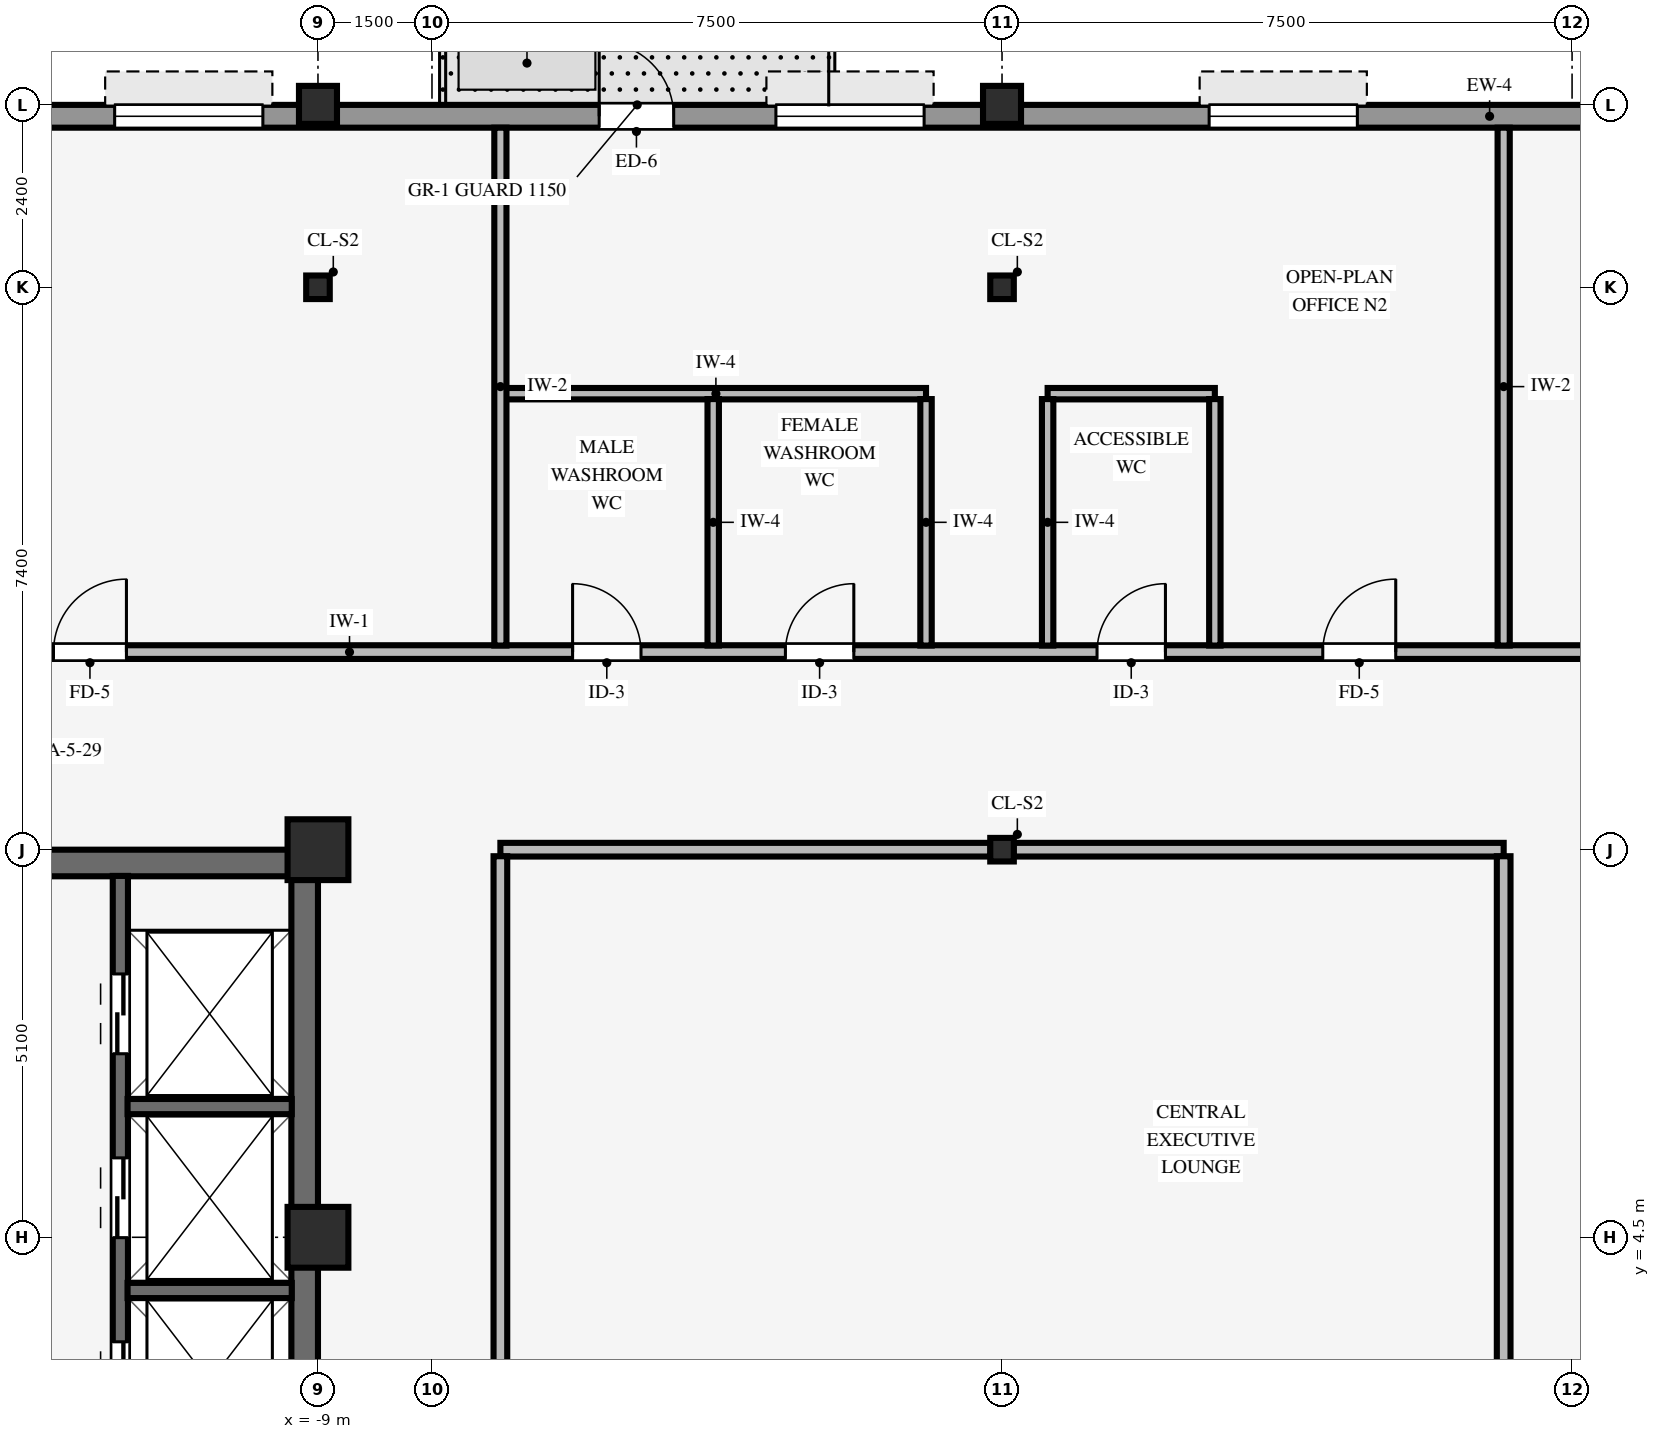
"""IFC4 building model, lengths in metres.
Left out: names, types, materials, properties, quantities, classifications, styles, units other than length and angle.
Written with IfcOpenShell. Run it as: python <this file> out.ifc"""

import sys

from ifc_helpers import new_model, si_unit, direction, frame, frame_2d, origin, origin_2d, place, context, subcontext, project, spatial, rectangle, hollow_rectangle, i_section, extrude, source, transform, mapped, element, fill, save


model = new_model("IFC4")
c1 = context("Model", 3, precision=1e-05, world=origin(), true_north=direction((0.0, 1.0)))
c2 = subcontext(c1, "Body", "Model", "MODEL_VIEW")
j1 = project(units=[si_unit("LENGTHUNIT", "METRE"), si_unit("PLANEANGLEUNIT", "RADIAN")], contexts=[c1])
p1 = place(None, origin())
s1 = spatial("IfcSite", under=j1, at=p1, CompositionType="ELEMENT")
p2 = place(p1, origin())
s2 = spatial("IfcBuilding", under=s1, at=p2, CompositionType="ELEMENT")
p3 = place(p2, frame((0.0, 0.0, 245.65)))
s3 = spatial("IfcBuildingStorey", under=s2, at=p3, CompositionType="ELEMENT", Elevation=245.65)
p4 = place(p3, frame((-17.5, 9.425, 0.0), z_axis=(0.0, 0.0, 1.0), x_axis=(1.0, 0.0, 0.0)))
e1 = element("IfcWall", 1, at=p4, inside=s3, PredefinedType="SHEAR", context=c2, shape_type="SweptSolid", body=[
    extrude(rectangle(XDim=8.5, YDim=0.35, at=frame_2d((4.25, 0.0))), origin(), (0.0, 0.0, 1.0), 3.37),
])
p5 = place(p3, frame((-9.175, -9.255, 0.0), z_axis=(0.0, 0.0, 1.0), x_axis=(0.0, 1.0, 0.0)))
e2 = element("IfcWall", 2, at=p5, inside=s3, PredefinedType="SHEAR", context=c2, shape_type="SweptSolid", body=[
    extrude(rectangle(XDim=18.51, YDim=0.35, at=frame_2d((9.255, 0.0))), origin(), (0.0, 0.0, 1.0), 3.37),
])
p6 = place(p5, frame((8.655, 0.0, 0.0)))
e3 = element("IfcOpeningElement", 3, at=p6, cuts=e2, PredefinedType="OPENING", context=c2, shape_type="SweptSolid", body=[
    extrude(rectangle(XDim=1.2, YDim=2.15, at=frame_2d((0.6, 1.075))), frame((0.0, 0.185, 0.0), z_axis=(0.0, -1.0, 0.0), x_axis=(1.0, 0.0, 0.0)), (0.0, 0.0, 1.0), 0.37),
])
for number, where, z_axis, x_axis in (
    (4, (-9.0, 4.5, 0.0), (0.0, 0.0, 1.0), (1.0, 0.0, 0.0)),
    (5, (-9.0, 9.6, 0.0), (0.0, 0.0, 1.0), (1.0, 0.0, 0.0)),
):
    element("IfcColumn", number, at=place(p3, frame(where, z_axis=z_axis, x_axis=x_axis)), inside=s3, PredefinedType="COLUMN", context=c2, shape_type="SweptSolid", body=[
        extrude(rectangle(XDim=0.8, YDim=0.8, at=origin_2d()), origin(), (0.0, 0.0, 1.0), 3.37),
    ])
for number, where, z_axis, x_axis in (
    (6, (-9.0, 19.4, 0.0), (0.0, 0.0, 1.0), (1.0, 0.0, 0.0)),
    (7, (0.0, 19.4, 0.0), (0.0, 0.0, 1.0), (1.0, 0.0, 0.0)),
):
    element("IfcColumn", number, at=place(p3, frame(where, z_axis=z_axis, x_axis=x_axis)), inside=s3, PredefinedType="COLUMN", context=c2, shape_type="SweptSolid", body=[
        extrude(hollow_rectangle(XDim=0.5, YDim=0.5, WallThickness=0.032, InnerFilletRadius=0.032, OuterFilletRadius=0.064, at=origin_2d()), origin(), (0.0, 0.0, 1.0), 3.37),
    ])
for number, where, z_axis, x_axis in (
    (8, (0.0, 9.6, 0.0), (0.0, 0.0, 1.0), (1.0, 0.0, 0.0)),
    (9, (0.0, 17.0, 0.0), (0.0, 0.0, 1.0), (1.0, 0.0, 0.0)),
    (10, (-9.0, 17.0, 0.0), (0.0, 0.0, 1.0), (1.0, 0.0, 0.0)),
):
    element("IfcColumn", number, at=place(p3, frame(where, z_axis=z_axis, x_axis=x_axis)), inside=s3, PredefinedType="COLUMN", context=c2, shape_type="SweptSolid", body=[
        extrude(i_section(OverallWidth=0.31, OverallDepth=0.31, WebThickness=0.015, FlangeThickness=0.015, FilletRadius=0.015, at=origin_2d()), origin(), (0.0, 0.0, 1.0), 3.37),
    ])
p7 = place(p3, frame((-18.9, 19.25, 0.0), z_axis=(0.0, 0.0, 1.0), x_axis=(1.0, 0.0, 0.0)))
e11 = element("IfcWall", 11, at=p7, inside=s3, PredefinedType="STANDARD", context=c2, shape_type="SweptSolid", body=[
    extrude(rectangle(XDim=35.6, YDim=0.3, at=frame_2d((17.8, 0.0))), origin(), (0.0, 0.0, 1.0), 2.705),
])
p8 = place(p7, frame((13.6, 0.0, 0.0)))
e12 = element("IfcOpeningElement", 12, at=p8, cuts=e11, PredefinedType="OPENING", context=c2, shape_type="SweptSolid", body=[
    extrude(rectangle(XDim=0.98, YDim=2.15, at=frame_2d((0.49, 1.075))), frame((0.0, 0.16, 0.0), z_axis=(0.0, -1.0, 0.0), x_axis=(1.0, 0.0, 0.0)), (0.0, 0.0, 1.0), 0.32),
])
p9 = place(p7, frame((2.425, 0.0, 0.8)))
e13 = element("IfcOpeningElement", 13, at=p9, cuts=e11, PredefinedType="OPENING", context=c2, shape_type="SweptSolid", body=[
    extrude(rectangle(XDim=1.95, YDim=1.48, at=frame_2d((0.975, 0.74))), frame((0.0, 0.16, 0.0), z_axis=(0.0, -1.0, 0.0), x_axis=(1.0, 0.0, 0.0)), (0.0, 0.0, 1.0), 0.32),
])
p10 = place(p7, frame((7.225, 0.0, 0.8)))
e14 = element("IfcOpeningElement", 14, at=p10, cuts=e11, PredefinedType="OPENING", context=c2, shape_type="SweptSolid", body=[
    extrude(rectangle(XDim=1.95, YDim=1.48, at=frame_2d((0.975, 0.74))), frame((0.0, 0.16, 0.0), z_axis=(0.0, -1.0, 0.0), x_axis=(1.0, 0.0, 0.0)), (0.0, 0.0, 1.0), 0.32),
])
p11 = place(p7, frame((15.925, 0.0, 0.8)))
e15 = element("IfcOpeningElement", 15, at=p11, cuts=e11, PredefinedType="OPENING", context=c2, shape_type="SweptSolid", body=[
    extrude(rectangle(XDim=1.95, YDim=1.48, at=frame_2d((0.975, 0.74))), frame((0.0, 0.16, 0.0), z_axis=(0.0, -1.0, 0.0), x_axis=(1.0, 0.0, 0.0)), (0.0, 0.0, 1.0), 0.32),
])
p12 = place(p7, frame((21.625, 0.0, 0.8)))
e16 = element("IfcOpeningElement", 16, at=p12, cuts=e11, PredefinedType="OPENING", context=c2, shape_type="SweptSolid", body=[
    extrude(rectangle(XDim=1.95, YDim=1.48, at=frame_2d((0.975, 0.74))), frame((0.0, 0.16, 0.0), z_axis=(0.0, -1.0, 0.0), x_axis=(1.0, 0.0, 0.0)), (0.0, 0.0, 1.0), 0.32),
])
p13 = place(p7, frame((32.125, 0.0, 0.8)))
e17 = element("IfcOpeningElement", 17, at=p13, cuts=e11, PredefinedType="OPENING", context=c2, shape_type="SweptSolid", body=[
    extrude(rectangle(XDim=1.95, YDim=1.48, at=frame_2d((0.975, 0.74))), frame((0.0, 0.16, 0.0), z_axis=(0.0, -1.0, 0.0), x_axis=(1.0, 0.0, 0.0)), (0.0, 0.0, 1.0), 0.32),
])
p14 = place(p3, frame((-11.6, 1.3, 0.0), z_axis=(0.0, 0.0, 1.0), x_axis=(0.0, 1.0, 0.0)))
e18 = element("IfcWall", 18, at=p14, inside=s3, PredefinedType="SHEAR", context=c2, shape_type="SweptSolid", body=[
    extrude(rectangle(XDim=7.955, YDim=0.2, at=frame_2d((3.978, 0.0))), origin(), (0.0, 0.0, 1.0), 3.37),
])
p15 = place(p14, frame((0.775, 0.0, 0.0)))
e19 = element("IfcOpeningElement", 19, at=p15, cuts=e18, PredefinedType="OPENING", context=c2, shape_type="SweptSolid", body=[
    extrude(rectangle(XDim=1.05, YDim=2.15, at=frame_2d((0.525, 1.075))), frame((0.0, 0.11, 0.0), z_axis=(0.0, -1.0, 0.0), x_axis=(1.0, 0.0, 0.0)), (0.0, 0.0, 1.0), 0.22),
])
p16 = place(p14, frame((3.195, 0.0, 0.0)))
e20 = element("IfcOpeningElement", 20, at=p16, cuts=e18, PredefinedType="OPENING", context=c2, shape_type="SweptSolid", body=[
    extrude(rectangle(XDim=1.05, YDim=2.15, at=frame_2d((0.525, 1.075))), frame((0.0, 0.11, 0.0), z_axis=(0.0, -1.0, 0.0), x_axis=(1.0, 0.0, 0.0)), (0.0, 0.0, 1.0), 0.22),
])
p17 = place(p14, frame((5.615, 0.0, 0.0)))
e21 = element("IfcOpeningElement", 21, at=p17, cuts=e18, PredefinedType="OPENING", context=c2, shape_type="SweptSolid", body=[
    extrude(rectangle(XDim=1.05, YDim=2.15, at=frame_2d((0.525, 1.075))), frame((0.0, 0.11, 0.0), z_axis=(0.0, -1.0, 0.0), x_axis=(1.0, 0.0, 0.0)), (0.0, 0.0, 1.0), 0.22),
])
for number, where, z_axis, x_axis in (
    (22, (-11.505, 3.8, 0.0), (0.0, 0.0, 1.0), (1.0, 0.0, 0.0)),
    (23, (-11.505, 6.22, 0.0), (0.0, 0.0, 1.0), (1.0, 0.0, 0.0)),
):
    element("IfcWall", number, at=place(p3, frame(where, z_axis=z_axis, x_axis=x_axis)), inside=s3, PredefinedType="SHEAR", context=c2, shape_type="SweptSolid", body=[
        extrude(rectangle(XDim=2.16, YDim=0.2, at=frame_2d((1.08, 0.0))), origin(), (0.0, 0.0, 1.0), 3.37),
    ])
for number, where, z_axis, x_axis in (
    (24, (-6.6, 9.6, 0.0), (0.0, 0.0, 1.0), (1.0, 0.0, 0.0)),
    (25, (0.151, 9.6, 0.0), (0.0, 0.0, 1.0), (1.0, 0.0, 0.0)),
):
    element("IfcWall", number, at=place(p3, frame(where, z_axis=z_axis, x_axis=x_axis)), inside=s3, PredefinedType="PARTITIONING", context=c2, shape_type="SweptSolid", body=[
        extrude(rectangle(XDim=6.449, YDim=0.18, at=frame_2d((3.225, 0.0))), origin(), (0.0, 0.0, 1.0), 2.405),
    ])
p18 = place(p3, frame((-15.0, 12.2, 0.0), z_axis=(0.0, 0.0, 1.0), x_axis=(1.0, 0.0, 0.0)))
e26 = element("IfcWall", 26, at=p18, inside=s3, PredefinedType="PARTITIONING", context=c2, shape_type="SweptSolid", body=[
    extrude(rectangle(XDim=30.8, YDim=0.18, at=frame_2d((15.4, 0.0))), origin(), (0.0, 0.0, 1.0), 3.36),
])
p19 = place(p18, frame((2.52, 0.0, 0.0)))
e27 = element("IfcOpeningElement", 27, at=p19, cuts=e26, PredefinedType="OPENING", context=c2, shape_type="SweptSolid", body=[
    extrude(rectangle(XDim=0.96, YDim=2.1, at=frame_2d((0.48, 1.05))), frame((0.0, 0.1, 0.0), z_axis=(0.0, -1.0, 0.0), x_axis=(1.0, 0.0, 0.0)), (0.0, 0.0, 1.0), 0.2),
])
p20 = place(p18, frame((19.22, 0.0, 0.0)))
e28 = element("IfcOpeningElement", 28, at=p20, cuts=e26, PredefinedType="OPENING", context=c2, shape_type="SweptSolid", body=[
    extrude(rectangle(XDim=0.96, YDim=2.1, at=frame_2d((0.48, 1.05))), frame((0.0, 0.1, 0.0), z_axis=(0.0, -1.0, 0.0), x_axis=(1.0, 0.0, 0.0)), (0.0, 0.0, 1.0), 0.2),
])
p21 = place(p18, frame((25.32, 0.0, 0.0)))
e29 = element("IfcOpeningElement", 29, at=p21, cuts=e26, PredefinedType="OPENING", context=c2, shape_type="SweptSolid", body=[
    extrude(rectangle(XDim=0.96, YDim=2.1, at=frame_2d((0.48, 1.05))), frame((0.0, 0.1, 0.0), z_axis=(0.0, -1.0, 0.0), x_axis=(1.0, 0.0, 0.0)), (0.0, 0.0, 1.0), 0.2),
])
p22 = place(p18, frame((28.72, 0.0, 0.0)))
e30 = element("IfcOpeningElement", 30, at=p22, cuts=e26, PredefinedType="OPENING", context=c2, shape_type="SweptSolid", body=[
    extrude(rectangle(XDim=0.96, YDim=2.1, at=frame_2d((0.48, 1.05))), frame((0.0, 0.1, 0.0), z_axis=(0.0, -1.0, 0.0), x_axis=(1.0, 0.0, 0.0)), (0.0, 0.0, 1.0), 0.2),
])
p23 = place(p18, frame((9.35, 0.0, 0.0)))
e31 = element("IfcOpeningElement", 31, at=p23, cuts=e26, PredefinedType="OPENING", context=c2, shape_type="SweptSolid", body=[
    extrude(rectangle(XDim=0.9, YDim=2.1, at=frame_2d((0.45, 1.05))), frame((0.0, 0.1, 0.0), z_axis=(0.0, -1.0, 0.0), x_axis=(1.0, 0.0, 0.0)), (0.0, 0.0, 1.0), 0.2),
])
p24 = place(p18, frame((12.15, 0.0, 0.0)))
e32 = element("IfcOpeningElement", 32, at=p24, cuts=e26, PredefinedType="OPENING", context=c2, shape_type="SweptSolid", body=[
    extrude(rectangle(XDim=0.9, YDim=2.1, at=frame_2d((0.45, 1.05))), frame((0.0, 0.1, 0.0), z_axis=(0.0, -1.0, 0.0), x_axis=(1.0, 0.0, 0.0)), (0.0, 0.0, 1.0), 0.2),
])
p25 = place(p18, frame((16.25, 0.0, 0.0)))
e33 = element("IfcOpeningElement", 33, at=p25, cuts=e26, PredefinedType="OPENING", context=c2, shape_type="SweptSolid", body=[
    extrude(rectangle(XDim=0.9, YDim=2.1, at=frame_2d((0.45, 1.05))), frame((0.0, 0.1, 0.0), z_axis=(0.0, -1.0, 0.0), x_axis=(1.0, 0.0, 0.0)), (0.0, 0.0, 1.0), 0.2),
])
p26 = place(p3, frame((-6.529, 15.6, 0.0), z_axis=(0.0, 0.0, 1.0), x_axis=(1.0, 0.0, 0.0)))
e34 = element("IfcWall", 34, at=p26, inside=s3, PredefinedType="PARTITIONING", context=c2, shape_type="SweptSolid", body=[
    extrude(rectangle(XDim=5.529, YDim=0.15, at=frame_2d((2.765, 0.0))), origin(), (0.0, 0.0, 1.0), 3.36),
])
p27 = place(p3, frame((0.6, 15.6, 0.0), z_axis=(0.0, 0.0, 1.0), x_axis=(1.0, 0.0, 0.0)))
e35 = element("IfcWall", 35, at=p27, inside=s3, PredefinedType="PARTITIONING", context=c2, shape_type="SweptSolid", body=[
    extrude(rectangle(XDim=2.2, YDim=0.15, at=frame_2d((1.1, 0.0))), origin(), (0.0, 0.0, 1.0), 3.36),
])
p28 = place(p3, frame((-6.6, 1.336, 0.0), z_axis=(0.0, 0.0, 1.0), x_axis=(0.0, 1.0, 0.0)))
e36 = element("IfcWall", 36, at=p28, inside=s3, PredefinedType="PARTITIONING", context=c2, shape_type="SweptSolid", body=[
    extrude(rectangle(XDim=8.178, YDim=0.18, at=frame_2d((4.089, 0.0))), origin(), (0.0, 0.0, 1.0), 3.36),
])
p29 = place(p3, frame((-6.6, 12.286, 0.0), z_axis=(0.0, 0.0, 1.0), x_axis=(0.0, 1.0, 0.0)))
e37 = element("IfcWall", 37, at=p29, inside=s3, PredefinedType="PARTITIONING", context=c2, shape_type="SweptSolid", body=[
    extrude(rectangle(XDim=6.814, YDim=0.16, at=frame_2d((3.407, 0.0))), origin(), (0.0, 0.0, 1.0), 3.36),
])
for number, where, z_axis, x_axis in (
    (38, (-3.8, 12.286, 0.0), (0.0, 0.0, 1.0), (0.0, 1.0, 0.0)),
    (39, (-1.0, 12.286, 0.0), (0.0, 0.0, 1.0), (0.0, 1.0, 0.0)),
    (40, (0.6, 12.286, 0.0), (0.0, 0.0, 1.0), (0.0, 1.0, 0.0)),
    (41, (2.8, 12.286, 0.0), (0.0, 0.0, 1.0), (0.0, 1.0, 0.0)),
):
    element("IfcWall", number, at=place(p3, frame(where, z_axis=z_axis, x_axis=x_axis)), inside=s3, PredefinedType="PARTITIONING", context=c2, shape_type="SweptSolid", body=[
        extrude(rectangle(XDim=3.243, YDim=0.15, at=frame_2d((1.622, 0.0))), origin(), (0.0, 0.0, 1.0), 3.36),
    ])
p30 = place(p3, frame((6.6, 1.336, 0.0), z_axis=(0.0, 0.0, 1.0), x_axis=(0.0, 1.0, 0.0)))
e42 = element("IfcWall", 42, at=p30, inside=s3, PredefinedType="PARTITIONING", context=c2, shape_type="SweptSolid", body=[
    extrude(rectangle(XDim=8.178, YDim=0.18, at=frame_2d((4.089, 0.0))), origin(), (0.0, 0.0, 1.0), 3.36),
])
p31 = place(p3, frame((6.6, 12.286, 0.0), z_axis=(0.0, 0.0, 1.0), x_axis=(0.0, 1.0, 0.0)))
e43 = element("IfcWall", 43, at=p31, inside=s3, PredefinedType="PARTITIONING", context=c2, shape_type="SweptSolid", body=[
    extrude(rectangle(XDim=6.814, YDim=0.16, at=frame_2d((3.407, 0.0))), origin(), (0.0, 0.0, 1.0), 3.36),
])
m1 = source(origin(), c2, "Body", "SweptSolid", [
    extrude(rectangle(XDim=0.98, YDim=2.15, at=frame_2d((0.49, 1.075))), frame((0.0, 0.025, 0.0), z_axis=(0.0, -1.0, 0.0), x_axis=(1.0, 0.0, 0.0)), (0.0, 0.0, 1.0), 0.05),
])
p32 = place(p8, origin())
e44 = element("IfcDoor", 44, at=p32, inside=s3, OperationType="SINGLE_SWING_LEFT", PredefinedType="DOOR", context=c2, shape_type="MappedRepresentation", body=[
    mapped(m1, transform((0.0, 0.0, 0.0), scale=1.0)),
])
fill(e12, e44)
m2 = source(origin(), c2, "Body", "SweptSolid", [
    extrude(rectangle(XDim=1.95, YDim=1.48, at=frame_2d((0.975, 0.74))), frame((0.0, 0.03, 0.0), z_axis=(0.0, -1.0, 0.0), x_axis=(1.0, 0.0, 0.0)), (0.0, 0.0, 1.0), 0.06),
])
p33 = place(p10, origin())
e45 = element("IfcWindow", 45, at=p33, inside=s3, PartitioningType="SINGLE_PANEL", PredefinedType="WINDOW", context=c2, shape_type="MappedRepresentation", body=[
    mapped(m2, transform((0.0, 0.0, 0.0), scale=1.0)),
])
fill(e14, e45)
p34 = place(p11, origin())
e46 = element("IfcWindow", 46, at=p34, inside=s3, PartitioningType="SINGLE_PANEL", PredefinedType="WINDOW", context=c2, shape_type="MappedRepresentation", body=[
    mapped(m2, transform((0.0, 0.0, 0.0), scale=1.0)),
])
fill(e15, e46)
p35 = place(p12, origin())
e47 = element("IfcWindow", 47, at=p35, inside=s3, PartitioningType="SINGLE_PANEL", PredefinedType="WINDOW", context=c2, shape_type="MappedRepresentation", body=[
    mapped(m2, transform((0.0, 0.0, 0.0), scale=1.0)),
])
fill(e16, e47)
m3 = source(origin(), c2, "Body", "SweptSolid", [
    extrude(rectangle(XDim=1.05, YDim=2.15, at=frame_2d((0.525, 1.075))), frame((0.0, 0.025, 0.0), z_axis=(0.0, -1.0, 0.0), x_axis=(1.0, 0.0, 0.0)), (0.0, 0.0, 1.0), 0.05),
])
p36 = place(p15, origin())
e48 = element("IfcDoor", 48, at=p36, inside=s3, OperationType="DOUBLE_DOOR_SLIDING", PredefinedType="DOOR", context=c2, shape_type="MappedRepresentation", body=[
    mapped(m3, transform((0.0, 0.0, 0.0), scale=1.0)),
])
fill(e19, e48)
p37 = place(p16, origin())
e49 = element("IfcDoor", 49, at=p37, inside=s3, OperationType="DOUBLE_DOOR_SLIDING", PredefinedType="DOOR", context=c2, shape_type="MappedRepresentation", body=[
    mapped(m3, transform((0.0, 0.0, 0.0), scale=1.0)),
])
fill(e20, e49)
p38 = place(p17, origin())
e50 = element("IfcDoor", 50, at=p38, inside=s3, OperationType="DOUBLE_DOOR_SLIDING", PredefinedType="DOOR", context=c2, shape_type="MappedRepresentation", body=[
    mapped(m3, transform((0.0, 0.0, 0.0), scale=1.0)),
])
fill(e21, e50)
m4 = source(origin(), c2, "Body", "SweptSolid", [
    extrude(rectangle(XDim=0.96, YDim=2.1, at=frame_2d((0.48, 1.05))), frame((0.0, 0.025, 0.0), z_axis=(0.0, -1.0, 0.0), x_axis=(1.0, 0.0, 0.0)), (0.0, 0.0, 1.0), 0.05),
])
p39 = place(p19, origin())
e51 = element("IfcDoor", 51, at=p39, inside=s3, OperationType="SINGLE_SWING_RIGHT", PredefinedType="DOOR", context=c2, shape_type="MappedRepresentation", body=[
    mapped(m4, transform((0.0, 0.0, 0.0), scale=1.0)),
])
fill(e27, e51)
p40 = place(p20, origin())
e52 = element("IfcDoor", 52, at=p40, inside=s3, OperationType="SINGLE_SWING_RIGHT", PredefinedType="DOOR", context=c2, shape_type="MappedRepresentation", body=[
    mapped(m4, transform((0.0, 0.0, 0.0), scale=1.0)),
])
fill(e28, e52)
m5 = source(origin(), c2, "Body", "SweptSolid", [
    extrude(rectangle(XDim=0.9, YDim=2.1, at=frame_2d((0.45, 1.05))), frame((0.0, 0.025, 0.0), z_axis=(0.0, -1.0, 0.0), x_axis=(1.0, 0.0, 0.0)), (0.0, 0.0, 1.0), 0.05),
])
p41 = place(p23, origin())
e53 = element("IfcDoor", 53, at=p41, inside=s3, OperationType="SINGLE_SWING_LEFT", PredefinedType="DOOR", context=c2, shape_type="MappedRepresentation", body=[
    mapped(m5, transform((0.0, 0.0, 0.0), scale=1.0)),
])
fill(e31, e53)
p42 = place(p24, origin())
e54 = element("IfcDoor", 54, at=p42, inside=s3, OperationType="SINGLE_SWING_RIGHT", PredefinedType="DOOR", context=c2, shape_type="MappedRepresentation", body=[
    mapped(m5, transform((0.0, 0.0, 0.0), scale=1.0)),
])
fill(e32, e54)
p43 = place(p25, origin())
e55 = element("IfcDoor", 55, at=p43, inside=s3, OperationType="SINGLE_SWING_RIGHT", PredefinedType="DOOR", context=c2, shape_type="MappedRepresentation", body=[
    mapped(m5, transform((0.0, 0.0, 0.0), scale=1.0)),
])
fill(e33, e55)
save(model, sys.argv[1])
